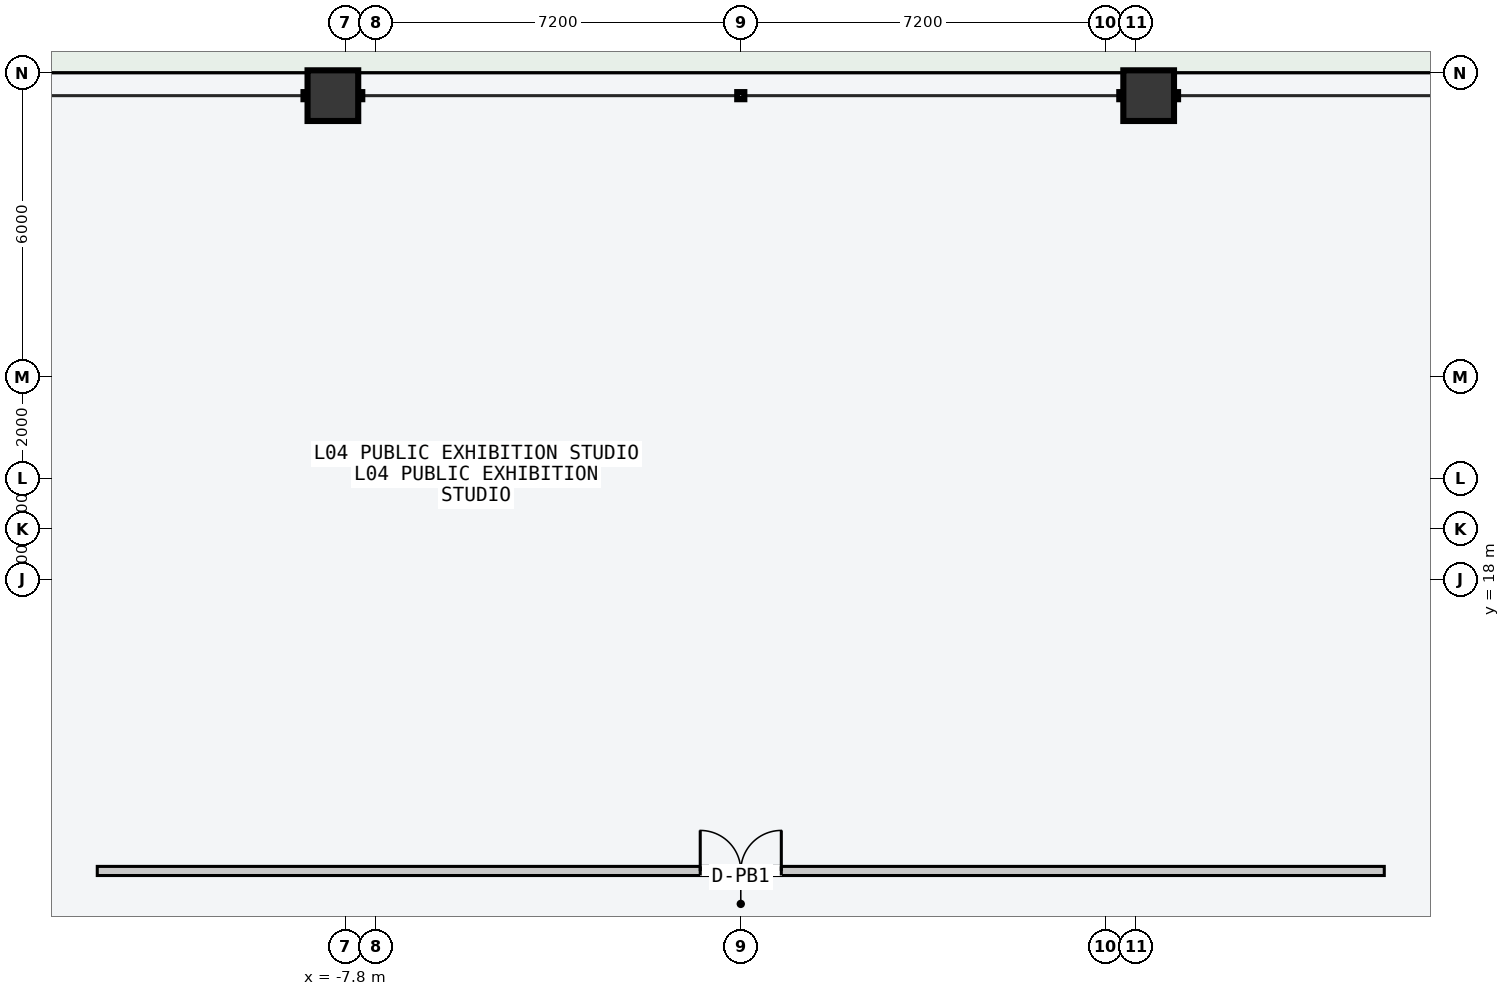
"""IFC4 building model, lengths in metres.
Left out: names, types, materials, properties, quantities, classifications, styles, units other than length and angle.
Written with IfcOpenShell. Run it as: python <this file> out.ifc"""

import sys

from ifc_helpers import new_model, si_unit, direction, frame, frame_2d, origin, origin_2d, place, context, subcontext, project, spatial, rectangle, hollow_rectangle, extrude, element, fill, save


model = new_model("IFC4")
c1 = context("Model", 3, precision=1e-05, world=origin(), true_north=direction((0.0, 1.0)))
c2 = subcontext(c1, "Body", "Model", "MODEL_VIEW")
j1 = project(units=[si_unit("LENGTHUNIT", "METRE"), si_unit("PLANEANGLEUNIT", "RADIAN")], contexts=[c1])
p1 = place(None, origin())
s1 = spatial("IfcSite", under=j1, at=p1, CompositionType="ELEMENT")
p2 = place(p1, origin())
s2 = spatial("IfcBuilding", under=s1, at=p2, CompositionType="ELEMENT")
p3 = place(p2, frame((0.0, 0.0, 19.2)))
s3 = spatial("IfcBuildingStorey", under=s2, at=p3, CompositionType="ELEMENT", Elevation=19.2)
for number, where, z_axis, x_axis in (
    (1, (-8.05, 27.55, 0.0), (0.0, 0.0, 1.0), (1.0, 0.0, 0.0)),
    (2, (8.05, 27.55, 0.0), (0.0, 0.0, 1.0), (1.0, 0.0, 0.0)),
):
    element("IfcColumn", number, at=place(p3, frame(where, z_axis=z_axis, x_axis=x_axis)), inside=s3, PredefinedType="COLUMN", context=c2, shape_type="SweptSolid", body=[
        extrude(hollow_rectangle(XDim=1.0, YDim=1.0, WallThickness=0.05, at=origin_2d()), origin(), (0.0, 0.0, 1.0), 4.8),
    ])
p4 = place(p3, frame((-12.7, 12.25, 0.0), z_axis=(0.0, 0.0, 1.0), x_axis=(1.0, 0.0, 0.0)))
e3 = element("IfcWall", 3, at=p4, inside=s3, PredefinedType="PARTITIONING", context=c2, shape_type="SweptSolid", body=[
    extrude(rectangle(XDim=25.4, YDim=0.18, at=frame_2d((12.7, 0.0))), origin(), (0.0, 0.0, 1.0), 4.6),
])
p5 = place(p4, frame((11.9, 0.0, 0.0)))
e4 = element("IfcOpeningElement", 4, at=p5, cuts=e3, PredefinedType="OPENING", context=c2, shape_type="SweptSolid", body=[
    extrude(rectangle(XDim=1.6, YDim=2.3, at=frame_2d((0.8, 1.15))), frame((0.0, 0.1, 0.0), z_axis=(0.0, -1.0, 0.0), x_axis=(1.0, 0.0, 0.0)), (0.0, 0.0, 1.0), 0.2),
])
p6 = place(p5, origin())
e5 = element("IfcDoor", 5, at=p6, inside=s3, OperationType="DOUBLE_DOOR_SINGLE_SWING", PredefinedType="DOOR", context=c2, shape_type="SweptSolid", body=[
    extrude(rectangle(XDim=1.6, YDim=2.3, at=frame_2d((0.8, 1.15))), frame((0.0, 0.025, 0.0), z_axis=(0.0, -1.0, 0.0), x_axis=(1.0, 0.0, 0.0)), (0.0, 0.0, 1.0), 0.05),
])
fill(e4, e5)
save(model, sys.argv[1])
